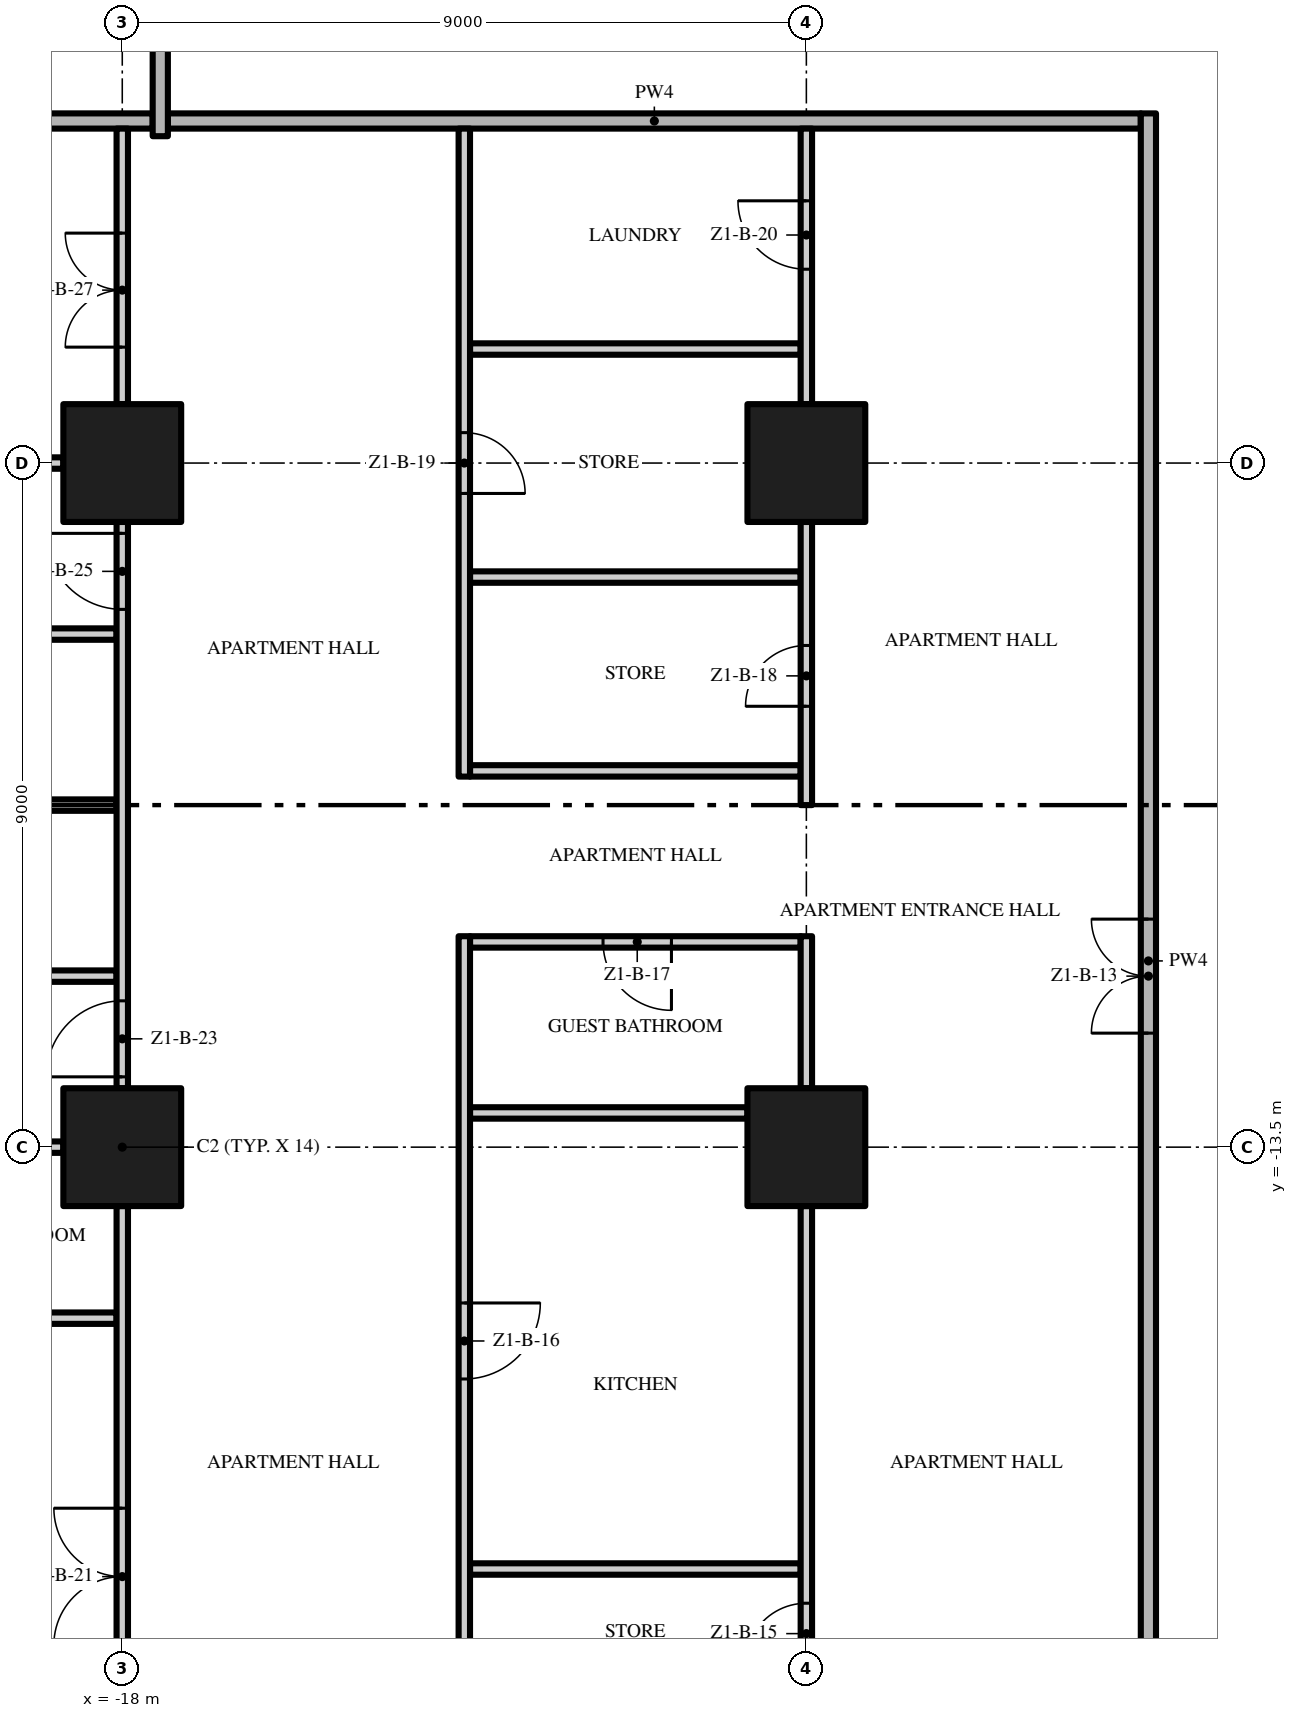
"""IFC4 building model, lengths in metres.
Left out: names, types, materials, properties, quantities, classifications, styles, units other than length and angle.
Written with IfcOpenShell. Run it as: python <this file> out.ifc"""

import sys

from ifc_helpers import new_model, si_unit, direction, frame, frame_2d, origin, origin_2d, place, context, subcontext, project, spatial, rectangle, extrude, element, fill, save


model = new_model("IFC4")
c1 = context("Model", 3, precision=1e-05, world=origin(), true_north=direction((0.0, 1.0)))
c2 = subcontext(c1, "Body", "Model", "MODEL_VIEW")
j1 = project(units=[si_unit("LENGTHUNIT", "METRE"), si_unit("PLANEANGLEUNIT", "RADIAN")], contexts=[c1])
p1 = place(None, origin())
s1 = spatial("IfcSite", under=j1, at=p1, CompositionType="ELEMENT")
p2 = place(p1, origin())
s2 = spatial("IfcBuilding", under=s1, at=p2, CompositionType="ELEMENT")
p3 = place(p2, frame((0.0, 0.0, 30.2)))
s3 = spatial("IfcBuildingStorey", under=s2, at=p3, CompositionType="ELEMENT", Elevation=30.2)
for number, where, z_axis, x_axis in (
    (1, (-18.0, -13.5, 0.0), (0.0, 0.0, 1.0), (1.0, 0.0, 0.0)),
    (2, (-18.0, -4.5, 0.0), (0.0, 0.0, 1.0), (1.0, 0.0, 0.0)),
    (3, (-9.0, -13.5, 0.0), (0.0, 0.0, 1.0), (1.0, 0.0, 0.0)),
    (4, (-9.0, -4.5, 0.0), (0.0, 0.0, 1.0), (1.0, 0.0, 0.0)),
):
    element("IfcColumn", number, at=place(p3, frame(where, z_axis=z_axis, x_axis=x_axis)), inside=s3, PredefinedType="COLUMN", context=c2, shape_type="SweptSolid", body=[
        extrude(rectangle(XDim=1.55, YDim=1.55, at=origin_2d()), origin(), (0.0, 0.0, 1.0), 3.5),
    ])
p4 = place(p3, frame((-13.425, -19.05, 0.0), z_axis=(0.0, 0.0, 1.0), x_axis=(1.0, 0.0, 0.0)))
e5 = element("IfcWall", 5, at=p4, inside=s3, PredefinedType="PARTITIONING", context=c2, shape_type="SweptSolid", body=[
    extrude(rectangle(XDim=4.35, YDim=0.15, at=frame_2d((2.175, 0.0))), origin(), (0.0, 0.0, 1.0), 3.5),
])
p5 = place(p3, frame((-20.925, -15.75, 0.0), z_axis=(0.0, 0.0, 1.0), x_axis=(1.0, 0.0, 0.0)))
e6 = element("IfcWall", 6, at=p5, inside=s3, PredefinedType="PARTITIONING", context=c2, shape_type="SweptSolid", body=[
    extrude(rectangle(XDim=2.85, YDim=0.15, at=frame_2d((1.425, 0.0))), origin(), (0.0, 0.0, 1.0), 3.5),
])
p6 = place(p3, frame((-25.55, -13.5, 0.0), z_axis=(0.0, 0.0, 1.0), x_axis=(1.0, 0.0, 0.0)))
e7 = element("IfcWall", 7, at=p6, inside=s3, PredefinedType="PARTITIONING", context=c2, shape_type="SweptSolid", body=[
    extrude(rectangle(XDim=6.775, YDim=0.15, at=frame_2d((3.388, 0.0))), origin(), (0.0, 0.0, 1.0), 3.5),
])
p7 = place(p3, frame((-13.425, -13.05, 0.0), z_axis=(0.0, 0.0, 1.0), x_axis=(1.0, 0.0, 0.0)))
e8 = element("IfcWall", 8, at=p7, inside=s3, PredefinedType="PARTITIONING", context=c2, shape_type="SweptSolid", body=[
    extrude(rectangle(XDim=3.65, YDim=0.15, at=frame_2d((1.825, 0.0))), origin(), (0.0, 0.0, 1.0), 3.5),
])
p8 = place(p3, frame((-20.925, -11.25, 0.0), z_axis=(0.0, 0.0, 1.0), x_axis=(1.0, 0.0, 0.0)))
e9 = element("IfcWall", 9, at=p8, inside=s3, PredefinedType="PARTITIONING", context=c2, shape_type="SweptSolid", body=[
    extrude(rectangle(XDim=2.85, YDim=0.15, at=frame_2d((1.425, 0.0))), origin(), (0.0, 0.0, 1.0), 3.5),
])
p9 = place(p3, frame((-9.075, -10.8, 0.0), z_axis=(0.0, 0.0, 1.0), x_axis=(-1.0, 0.0, 0.0)))
e10 = element("IfcWall", 10, at=p9, inside=s3, PredefinedType="PARTITIONING", context=c2, shape_type="SweptSolid", body=[
    extrude(rectangle(XDim=4.35, YDim=0.15, at=frame_2d((2.175, 0.0))), origin(), (0.0, 0.0, 1.0), 3.5),
])
p10 = place(p9, frame((1.7, 0.0, 0.0)))
e11 = element("IfcOpeningElement", 11, at=p10, cuts=e10, PredefinedType="OPENING", context=c2, shape_type="SweptSolid", body=[
    extrude(rectangle(XDim=0.9, YDim=2.1, at=frame_2d((0.45, 1.05))), frame((0.0, 0.085, 0.0), z_axis=(0.0, -1.0, 0.0), x_axis=(1.0, 0.0, 0.0)), (0.0, 0.0, 1.0), 0.17),
])
p11 = place(p3, frame((-20.925, -9.0, 0.0), z_axis=(0.0, 0.0, 1.0), x_axis=(1.0, 0.0, 0.0)))
e12 = element("IfcWall", 12, at=p11, inside=s3, PredefinedType="PARTITIONING", context=c2, shape_type="SweptSolid", body=[
    extrude(rectangle(XDim=2.85, YDim=0.15, at=frame_2d((1.425, 0.0))), origin(), (0.0, 0.0, 1.0), 3.5),
])
p12 = place(p3, frame((-13.425, -8.55, 0.0), z_axis=(0.0, 0.0, 1.0), x_axis=(1.0, 0.0, 0.0)))
e13 = element("IfcWall", 13, at=p12, inside=s3, PredefinedType="PARTITIONING", context=c2, shape_type="SweptSolid", body=[
    extrude(rectangle(XDim=4.35, YDim=0.15, at=frame_2d((2.175, 0.0))), origin(), (0.0, 0.0, 1.0), 3.5),
])
p13 = place(p3, frame((-20.925, -6.75, 0.0), z_axis=(0.0, 0.0, 1.0), x_axis=(1.0, 0.0, 0.0)))
e14 = element("IfcWall", 14, at=p13, inside=s3, PredefinedType="PARTITIONING", context=c2, shape_type="SweptSolid", body=[
    extrude(rectangle(XDim=2.85, YDim=0.15, at=frame_2d((1.425, 0.0))), origin(), (0.0, 0.0, 1.0), 3.5),
])
p14 = place(p3, frame((-13.425, -6.0, 0.0), z_axis=(0.0, 0.0, 1.0), x_axis=(1.0, 0.0, 0.0)))
e15 = element("IfcWall", 15, at=p14, inside=s3, PredefinedType="PARTITIONING", context=c2, shape_type="SweptSolid", body=[
    extrude(rectangle(XDim=4.35, YDim=0.15, at=frame_2d((2.175, 0.0))), origin(), (0.0, 0.0, 1.0), 3.5),
])
p15 = place(p3, frame((-25.55, -4.5, 0.0), z_axis=(0.0, 0.0, 1.0), x_axis=(1.0, 0.0, 0.0)))
e16 = element("IfcWall", 16, at=p15, inside=s3, PredefinedType="PARTITIONING", context=c2, shape_type="SweptSolid", body=[
    extrude(rectangle(XDim=6.775, YDim=0.15, at=frame_2d((3.388, 0.0))), origin(), (0.0, 0.0, 1.0), 3.5),
])
p16 = place(p3, frame((-13.425, -3.0, 0.0), z_axis=(0.0, 0.0, 1.0), x_axis=(1.0, 0.0, 0.0)))
e17 = element("IfcWall", 17, at=p16, inside=s3, PredefinedType="PARTITIONING", context=c2, shape_type="SweptSolid", body=[
    extrude(rectangle(XDim=4.35, YDim=0.15, at=frame_2d((2.175, 0.0))), origin(), (0.0, 0.0, 1.0), 3.5),
])
p17 = place(p3, frame((-17.4, 0.0, 0.0), z_axis=(0.0, 0.0, 1.0), x_axis=(1.0, 0.0, 0.0)))
e18 = element("IfcWall", 18, at=p17, inside=s3, PredefinedType="PARTITIONING", context=c2, shape_type="SweptSolid", body=[
    extrude(rectangle(XDim=12.8, YDim=0.2, at=frame_2d((6.4, 0.0))), origin(), (0.0, 0.0, 1.0), 3.5),
])
p18 = place(p3, frame((-26.7, 0.0, 0.0), z_axis=(0.0, 0.0, 1.0), x_axis=(1.0, 0.0, 0.0)))
e19 = element("IfcWall", 19, at=p18, inside=s3, PredefinedType="PARTITIONING", context=c2, shape_type="SweptSolid", body=[
    extrude(rectangle(XDim=9.1, YDim=0.2, at=frame_2d((4.55, 0.0))), origin(), (0.0, 0.0, 1.0), 3.5),
])
p19 = place(p3, frame((-18.0, -21.05, 0.0), z_axis=(0.0, 0.0, 1.0), x_axis=(0.0, 1.0, 0.0)))
e20 = element("IfcWall", 20, at=p19, inside=s3, PredefinedType="PARTITIONING", context=c2, shape_type="SweptSolid", body=[
    extrude(rectangle(XDim=6.775, YDim=0.15, at=frame_2d((3.388, 0.0))), origin(), (0.0, 0.0, 1.0), 3.5),
])
p20 = place(p19, frame((1.0, 0.0, 0.0)))
e21 = element("IfcOpeningElement", 21, at=p20, cuts=e20, PredefinedType="OPENING", context=c2, shape_type="SweptSolid", body=[
    extrude(rectangle(XDim=1.8, YDim=2.4, at=frame_2d((0.9, 1.2))), frame((0.0, 0.085, 0.0), z_axis=(0.0, -1.0, 0.0), x_axis=(1.0, 0.0, 0.0)), (0.0, 0.0, 1.0), 0.17),
])
p21 = place(p3, frame((-18.0, -12.725, 0.0), z_axis=(0.0, 0.0, 1.0), x_axis=(0.0, 1.0, 0.0)))
e22 = element("IfcWall", 22, at=p21, inside=s3, PredefinedType="PARTITIONING", context=c2, shape_type="SweptSolid", body=[
    extrude(rectangle(XDim=7.45, YDim=0.15, at=frame_2d((3.725, 0.0))), origin(), (0.0, 0.0, 1.0), 3.5),
])
p22 = place(p21, frame((0.15, 0.0, 0.0)))
e23 = element("IfcOpeningElement", 23, at=p22, cuts=e22, PredefinedType="OPENING", context=c2, shape_type="SweptSolid", body=[
    extrude(rectangle(XDim=1.0, YDim=2.4, at=frame_2d((0.5, 1.2))), frame((0.0, 0.085, 0.0), z_axis=(0.0, -1.0, 0.0), x_axis=(1.0, 0.0, 0.0)), (0.0, 0.0, 1.0), 0.17),
])
p23 = place(p21, frame((6.3, 0.0, 0.0)))
e24 = element("IfcOpeningElement", 24, at=p23, cuts=e22, PredefinedType="OPENING", context=c2, shape_type="SweptSolid", body=[
    extrude(rectangle(XDim=1.0, YDim=2.4, at=frame_2d((0.5, 1.2))), frame((0.0, 0.085, 0.0), z_axis=(0.0, -1.0, 0.0), x_axis=(1.0, 0.0, 0.0)), (0.0, 0.0, 1.0), 0.17),
])
p24 = place(p3, frame((-18.0, -3.725, 0.0), z_axis=(0.0, 0.0, 1.0), x_axis=(0.0, 1.0, 0.0)))
e25 = element("IfcWall", 25, at=p24, inside=s3, PredefinedType="PARTITIONING", context=c2, shape_type="SweptSolid", body=[
    extrude(rectangle(XDim=3.625, YDim=0.15, at=frame_2d((1.812, 0.0))), origin(), (0.0, 0.0, 1.0), 3.5),
])
p25 = place(p24, frame((0.75, 0.0, 0.0)))
e26 = element("IfcOpeningElement", 26, at=p25, cuts=e25, PredefinedType="OPENING", context=c2, shape_type="SweptSolid", body=[
    extrude(rectangle(XDim=1.5, YDim=2.4, at=frame_2d((0.75, 1.2))), frame((0.0, 0.085, 0.0), z_axis=(0.0, -1.0, 0.0), x_axis=(1.0, 0.0, 0.0)), (0.0, 0.0, 1.0), 0.17),
])
p26 = place(p3, frame((-17.5, -0.2, 0.0), z_axis=(0.0, 0.0, 1.0), x_axis=(0.0, 1.0, 0.0)))
e27 = element("IfcWall", 27, at=p26, inside=s3, PredefinedType="PARTITIONING", context=c2, shape_type="SweptSolid", body=[
    extrude(rectangle(XDim=3.925, YDim=0.2, at=frame_2d((1.962, 0.0))), origin(), (0.0, 0.0, 1.0), 3.5),
])
p27 = place(p3, frame((-13.5, -10.725, 0.0), z_axis=(0.0, 0.0, 1.0), x_axis=(0.0, -1.0, 0.0)))
e28 = element("IfcWall", 28, at=p27, inside=s3, PredefinedType="PARTITIONING", context=c2, shape_type="SweptSolid", body=[
    extrude(rectangle(XDim=11.475, YDim=0.15, at=frame_2d((5.737, 0.0))), origin(), (0.0, 0.0, 1.0), 3.5),
])
p28 = place(p27, frame((10.475, 0.0, 0.0)))
e29 = element("IfcOpeningElement", 29, at=p28, cuts=e28, PredefinedType="OPENING", context=c2, shape_type="SweptSolid", body=[
    extrude(rectangle(XDim=0.8, YDim=2.0, at=frame_2d((0.4, 1.0))), frame((0.0, 0.085, 0.0), z_axis=(0.0, -1.0, 0.0), x_axis=(1.0, 0.0, 0.0)), (0.0, 0.0, 1.0), 0.17),
])
p29 = place(p27, frame((4.825, 0.0, 0.0)))
e30 = element("IfcOpeningElement", 30, at=p29, cuts=e28, PredefinedType="OPENING", context=c2, shape_type="SweptSolid", body=[
    extrude(rectangle(XDim=1.0, YDim=2.4, at=frame_2d((0.5, 1.2))), frame((0.0, 0.085, 0.0), z_axis=(0.0, -1.0, 0.0), x_axis=(1.0, 0.0, 0.0)), (0.0, 0.0, 1.0), 0.17),
])
p30 = place(p3, frame((-13.5, -0.1, 0.0), z_axis=(0.0, 0.0, 1.0), x_axis=(0.0, -1.0, 0.0)))
e31 = element("IfcWall", 31, at=p30, inside=s3, PredefinedType="PARTITIONING", context=c2, shape_type="SweptSolid", body=[
    extrude(rectangle(XDim=8.525, YDim=0.15, at=frame_2d((4.263, 0.0))), origin(), (0.0, 0.0, 1.0), 3.5),
])
p31 = place(p30, frame((4.0, 0.0, 0.0)))
e32 = element("IfcOpeningElement", 32, at=p31, cuts=e31, PredefinedType="OPENING", context=c2, shape_type="SweptSolid", body=[
    extrude(rectangle(XDim=0.8, YDim=2.0, at=frame_2d((0.4, 1.0))), frame((0.0, 0.085, 0.0), z_axis=(0.0, -1.0, 0.0), x_axis=(1.0, 0.0, 0.0)), (0.0, 0.0, 1.0), 0.17),
])
p32 = place(p3, frame((-9.0, -21.05, 0.0), z_axis=(0.0, 0.0, 1.0), x_axis=(0.0, 1.0, 0.0)))
e33 = element("IfcWall", 33, at=p32, inside=s3, PredefinedType="PARTITIONING", context=c2, shape_type="SweptSolid", body=[
    extrude(rectangle(XDim=6.775, YDim=0.15, at=frame_2d((3.388, 0.0))), origin(), (0.0, 0.0, 1.0), 3.5),
])
p33 = place(p32, frame((0.75, 0.0, 0.0)))
e34 = element("IfcOpeningElement", 34, at=p33, cuts=e33, PredefinedType="OPENING", context=c2, shape_type="SweptSolid", body=[
    extrude(rectangle(XDim=0.8, YDim=2.0, at=frame_2d((0.4, 1.0))), frame((0.0, 0.085, 0.0), z_axis=(0.0, -1.0, 0.0), x_axis=(1.0, 0.0, 0.0)), (0.0, 0.0, 1.0), 0.17),
])
p34 = place(p3, frame((-9.0, -12.725, 0.0), z_axis=(0.0, 0.0, 1.0), x_axis=(0.0, 1.0, 0.0)))
e35 = element("IfcWall", 35, at=p34, inside=s3, PredefinedType="PARTITIONING", context=c2, shape_type="SweptSolid", body=[
    extrude(rectangle(XDim=2.0, YDim=0.15, at=frame_2d((1.0, 0.0))), origin(), (0.0, 0.0, 1.0), 3.5),
])
p35 = place(p3, frame((-9.0, -9.0, 0.0), z_axis=(0.0, 0.0, 1.0), x_axis=(0.0, 1.0, 0.0)))
e36 = element("IfcWall", 36, at=p35, inside=s3, PredefinedType="PARTITIONING", context=c2, shape_type="SweptSolid", body=[
    extrude(rectangle(XDim=3.725, YDim=0.15, at=frame_2d((1.863, 0.0))), origin(), (0.0, 0.0, 1.0), 3.5),
])
p36 = place(p35, frame((1.3, 0.0, 0.0)))
e37 = element("IfcOpeningElement", 37, at=p36, cuts=e36, PredefinedType="OPENING", context=c2, shape_type="SweptSolid", body=[
    extrude(rectangle(XDim=0.8, YDim=2.0, at=frame_2d((0.4, 1.0))), frame((0.0, 0.085, 0.0), z_axis=(0.0, -1.0, 0.0), x_axis=(1.0, 0.0, 0.0)), (0.0, 0.0, 1.0), 0.17),
])
p37 = place(p3, frame((-9.0, -3.725, 0.0), z_axis=(0.0, 0.0, 1.0), x_axis=(0.0, 1.0, 0.0)))
e38 = element("IfcWall", 38, at=p37, inside=s3, PredefinedType="PARTITIONING", context=c2, shape_type="SweptSolid", body=[
    extrude(rectangle(XDim=3.625, YDim=0.15, at=frame_2d((1.812, 0.0))), origin(), (0.0, 0.0, 1.0), 3.5),
])
p38 = place(p37, frame((1.775, 0.0, 0.0)))
e39 = element("IfcOpeningElement", 39, at=p38, cuts=e38, PredefinedType="OPENING", context=c2, shape_type="SweptSolid", body=[
    extrude(rectangle(XDim=0.9, YDim=2.1, at=frame_2d((0.45, 1.05))), frame((0.0, 0.085, 0.0), z_axis=(0.0, -1.0, 0.0), x_axis=(1.0, 0.0, 0.0)), (0.0, 0.0, 1.0), 0.17),
])
p39 = place(p3, frame((-4.5, -22.2, 0.0), z_axis=(0.0, 0.0, 1.0), x_axis=(0.0, 1.0, 0.0)))
e40 = element("IfcWall", 40, at=p39, inside=s3, PredefinedType="PARTITIONING", context=c2, shape_type="SweptSolid", body=[
    extrude(rectangle(XDim=22.3, YDim=0.2, at=frame_2d((11.15, 0.0))), origin(), (0.0, 0.0, 1.0), 3.5),
])
p40 = place(p39, frame((10.2, 0.0, 0.0)))
e41 = element("IfcOpeningElement", 41, at=p40, cuts=e40, PredefinedType="OPENING", context=c2, shape_type="SweptSolid", body=[
    extrude(rectangle(XDim=1.5, YDim=2.4, at=frame_2d((0.75, 1.2))), frame((0.0, 0.11, 0.0), z_axis=(0.0, -1.0, 0.0), x_axis=(1.0, 0.0, 0.0)), (0.0, 0.0, 1.0), 0.22),
])
p41 = place(p40, origin())
e42 = element("IfcDoor", 42, at=p41, inside=s3, OperationType="DOUBLE_DOOR_SINGLE_SWING", PredefinedType="DOOR", context=c2, shape_type="SweptSolid", body=[
    extrude(rectangle(XDim=1.5, YDim=2.4, at=frame_2d((0.75, 1.2))), frame((0.0, 0.025, 0.0), z_axis=(0.0, -1.0, 0.0), x_axis=(1.0, 0.0, 0.0)), (0.0, 0.0, 1.0), 0.05),
])
fill(e41, e42)
p42 = place(p33, origin())
e43 = element("IfcDoor", 43, at=p42, inside=s3, OperationType="SINGLE_SWING_LEFT", PredefinedType="DOOR", context=c2, shape_type="SweptSolid", body=[
    extrude(rectangle(XDim=0.8, YDim=2.0, at=frame_2d((0.4, 1.0))), frame((0.0, 0.025, 0.0), z_axis=(0.0, -1.0, 0.0), x_axis=(1.0, 0.0, 0.0)), (0.0, 0.0, 1.0), 0.05),
])
fill(e34, e43)
p43 = place(p29, origin())
e44 = element("IfcDoor", 44, at=p43, inside=s3, OperationType="SINGLE_SWING_LEFT", PredefinedType="DOOR", context=c2, shape_type="SweptSolid", body=[
    extrude(rectangle(XDim=1.0, YDim=2.4, at=frame_2d((0.5, 1.2))), frame((0.0, 0.025, 0.0), z_axis=(0.0, -1.0, 0.0), x_axis=(1.0, 0.0, 0.0)), (0.0, 0.0, 1.0), 0.05),
])
fill(e30, e44)
p44 = place(p10, origin())
e45 = element("IfcDoor", 45, at=p44, inside=s3, OperationType="SINGLE_SWING_LEFT", PredefinedType="DOOR", context=c2, shape_type="SweptSolid", body=[
    extrude(rectangle(XDim=0.9, YDim=2.1, at=frame_2d((0.45, 1.05))), frame((0.0, 0.025, 0.0), z_axis=(0.0, -1.0, 0.0), x_axis=(1.0, 0.0, 0.0)), (0.0, 0.0, 1.0), 0.05),
])
fill(e11, e45)
p45 = place(p36, origin())
e46 = element("IfcDoor", 46, at=p45, inside=s3, OperationType="SINGLE_SWING_LEFT", PredefinedType="DOOR", context=c2, shape_type="SweptSolid", body=[
    extrude(rectangle(XDim=0.8, YDim=2.0, at=frame_2d((0.4, 1.0))), frame((0.0, 0.025, 0.0), z_axis=(0.0, -1.0, 0.0), x_axis=(1.0, 0.0, 0.0)), (0.0, 0.0, 1.0), 0.05),
])
fill(e37, e46)
p46 = place(p31, origin())
e47 = element("IfcDoor", 47, at=p46, inside=s3, OperationType="SINGLE_SWING_RIGHT", PredefinedType="DOOR", context=c2, shape_type="SweptSolid", body=[
    extrude(rectangle(XDim=0.8, YDim=2.0, at=frame_2d((0.4, 1.0))), frame((0.0, 0.025, 0.0), z_axis=(0.0, -1.0, 0.0), x_axis=(1.0, 0.0, 0.0)), (0.0, 0.0, 1.0), 0.05),
])
fill(e32, e47)
p47 = place(p38, origin())
e48 = element("IfcDoor", 48, at=p47, inside=s3, OperationType="SINGLE_SWING_RIGHT", PredefinedType="DOOR", context=c2, shape_type="SweptSolid", body=[
    extrude(rectangle(XDim=0.9, YDim=2.1, at=frame_2d((0.45, 1.05))), frame((0.0, 0.025, 0.0), z_axis=(0.0, -1.0, 0.0), x_axis=(1.0, 0.0, 0.0)), (0.0, 0.0, 1.0), 0.05),
])
fill(e39, e48)
p48 = place(p20, origin())
e49 = element("IfcDoor", 49, at=p48, inside=s3, OperationType="DOUBLE_DOOR_SINGLE_SWING", PredefinedType="DOOR", context=c2, shape_type="SweptSolid", body=[
    extrude(rectangle(XDim=1.8, YDim=2.4, at=frame_2d((0.9, 1.2))), frame((0.0, 0.025, 0.0), z_axis=(0.0, -1.0, 0.0), x_axis=(1.0, 0.0, 0.0)), (0.0, 0.0, 1.0), 0.05),
])
fill(e21, e49)
p49 = place(p22, origin())
e50 = element("IfcDoor", 50, at=p49, inside=s3, OperationType="SINGLE_SWING_LEFT", PredefinedType="DOOR", context=c2, shape_type="SweptSolid", body=[
    extrude(rectangle(XDim=1.0, YDim=2.4, at=frame_2d((0.5, 1.2))), frame((0.0, 0.025, 0.0), z_axis=(0.0, -1.0, 0.0), x_axis=(1.0, 0.0, 0.0)), (0.0, 0.0, 1.0), 0.05),
])
fill(e23, e50)
p50 = place(p23, origin())
e51 = element("IfcDoor", 51, at=p50, inside=s3, OperationType="SINGLE_SWING_RIGHT", PredefinedType="DOOR", context=c2, shape_type="SweptSolid", body=[
    extrude(rectangle(XDim=1.0, YDim=2.4, at=frame_2d((0.5, 1.2))), frame((0.0, 0.025, 0.0), z_axis=(0.0, -1.0, 0.0), x_axis=(1.0, 0.0, 0.0)), (0.0, 0.0, 1.0), 0.05),
])
fill(e24, e51)
p51 = place(p25, origin())
e52 = element("IfcDoor", 52, at=p51, inside=s3, OperationType="DOUBLE_DOOR_SINGLE_SWING", PredefinedType="DOOR", context=c2, shape_type="SweptSolid", body=[
    extrude(rectangle(XDim=1.5, YDim=2.4, at=frame_2d((0.75, 1.2))), frame((0.0, 0.025, 0.0), z_axis=(0.0, -1.0, 0.0), x_axis=(1.0, 0.0, 0.0)), (0.0, 0.0, 1.0), 0.05),
])
fill(e26, e52)
save(model, sys.argv[1])
